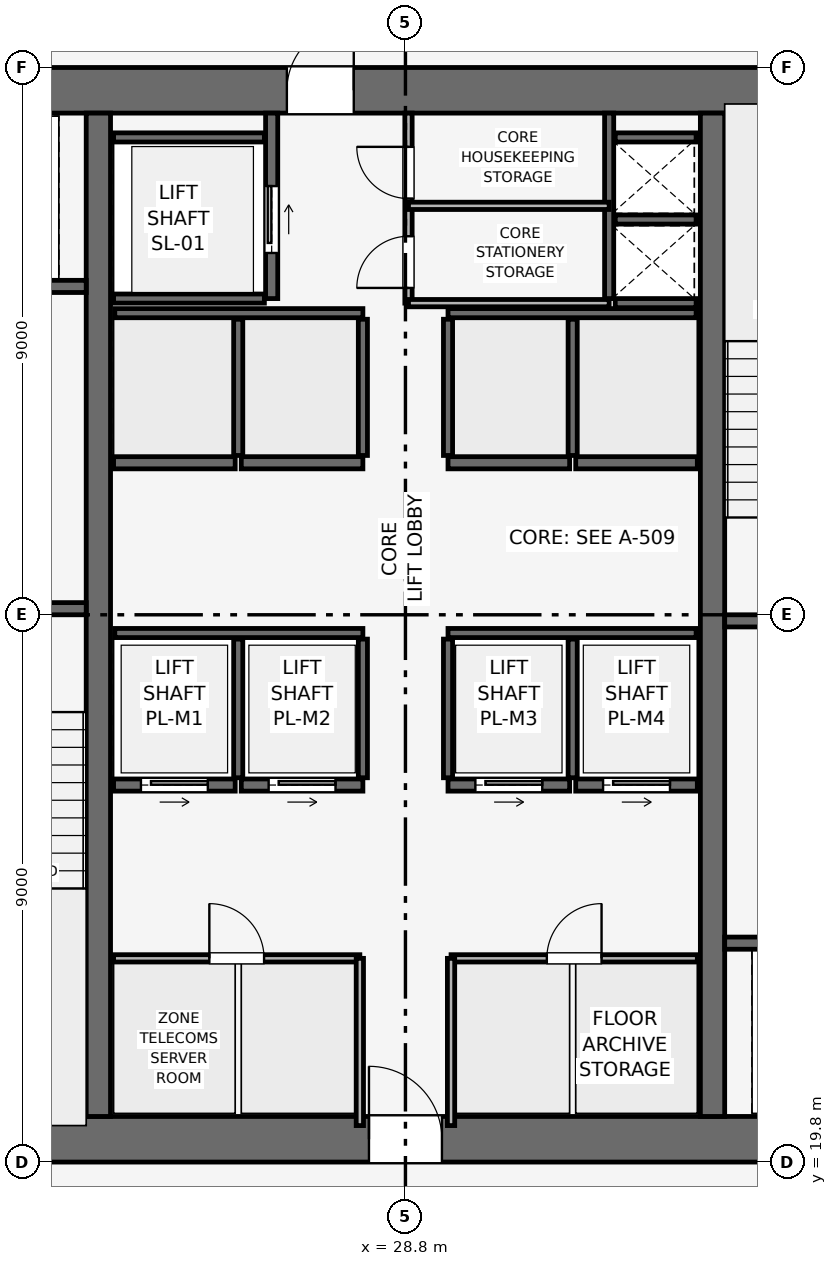
"""IFC4 building model, lengths in metres.
Left out: names, types, materials, properties, quantities, classifications, styles, units other than length and angle.
Written with IfcOpenShell. Run it as: python <this file> out.ifc"""

import sys

from ifc_helpers import new_model, si_unit, direction, frame, frame_2d, origin, place, context, subcontext, project, spatial, rectangle, extrude, element, fill, save


model = new_model("IFC4")
c1 = context("Model", 3, precision=1e-05, world=origin(), true_north=direction((0.0, 1.0)))
c2 = subcontext(c1, "Body", "Model", "MODEL_VIEW")
j1 = project(units=[si_unit("LENGTHUNIT", "METRE"), si_unit("PLANEANGLEUNIT", "RADIAN")], contexts=[c1])
p1 = place(None, origin())
s1 = spatial("IfcSite", under=j1, at=p1, CompositionType="ELEMENT")
p2 = place(p1, origin())
s2 = spatial("IfcBuilding", under=s1, at=p2, CompositionType="ELEMENT")
p3 = place(p2, frame((0.0, 0.0, 233.7)))
s3 = spatial("IfcBuildingStorey", under=s2, at=p3, CompositionType="ELEMENT", Elevation=233.7)
p4 = place(p3, frame((19.8, 20.175, 0.0), z_axis=(0.0, 0.0, 1.0), x_axis=(1.0, 0.0, 0.0)))
e1 = element("IfcWall", 1, at=p4, inside=s3, PredefinedType="SHEAR", context=c2, shape_type="SweptSolid", body=[
    extrude(rectangle(XDim=18.0, YDim=0.75, at=frame_2d((9.0, 0.0))), origin(), (0.0, 0.0, 1.0), 3.75),
])
p5 = place(p4, frame((8.4, 0.0, 0.0)))
e2 = element("IfcOpeningElement", 2, at=p5, cuts=e1, PredefinedType="OPENING", context=c2, shape_type="SweptSolid", body=[
    extrude(rectangle(XDim=1.2, YDim=2.2, at=frame_2d((0.6, 1.1))), frame((0.0, 0.385, 0.0), z_axis=(0.0, -1.0, 0.0), x_axis=(1.0, 0.0, 0.0)), (0.0, 0.0, 1.0), 0.77),
])
p6 = place(p3, frame((19.8, 37.425, 0.0), z_axis=(0.0, 0.0, 1.0), x_axis=(1.0, 0.0, 0.0)))
e3 = element("IfcWall", 3, at=p6, inside=s3, PredefinedType="SHEAR", context=c2, shape_type="SweptSolid", body=[
    extrude(rectangle(XDim=18.0, YDim=0.75, at=frame_2d((9.0, 0.0))), origin(), (0.0, 0.0, 1.0), 3.75),
])
p7 = place(p6, frame((7.05, 0.0, 0.0)))
e4 = element("IfcOpeningElement", 4, at=p7, cuts=e3, PredefinedType="OPENING", context=c2, shape_type="SweptSolid", body=[
    extrude(rectangle(XDim=1.1, YDim=2.15, at=frame_2d((0.55, 1.075))), frame((0.0, 0.385, 0.0), z_axis=(0.0, -1.0, 0.0), x_axis=(1.0, 0.0, 0.0)), (0.0, 0.0, 1.0), 0.77),
])
for number, where, z_axis, x_axis in (
    (5, (23.75, 20.55, 0.0), (0.0, 0.0, 1.0), (0.0, 1.0, 0.0)),
    (6, (33.85, 20.55, 0.0), (0.0, 0.0, 1.0), (0.0, 1.0, 0.0)),
):
    element("IfcWall", number, at=place(p3, frame(where, z_axis=z_axis, x_axis=x_axis)), inside=s3, PredefinedType="SHEAR", context=c2, shape_type="SweptSolid", body=[
        extrude(rectangle(XDim=16.5, YDim=0.4, at=frame_2d((8.25, 0.0))), origin(), (0.0, 0.0, 1.0), 3.75),
    ])
p8 = place(p3, frame((20.4, 28.9, 0.0), z_axis=(0.0, 0.0, 1.0), x_axis=(1.0, 0.0, 0.0)))
e7 = element("IfcWall", 7, at=p8, inside=s3, PredefinedType="SHEAR", context=c2, shape_type="SweptSolid", body=[
    extrude(rectangle(XDim=3.15, YDim=0.2, at=frame_2d((1.575, 0.0))), origin(), (0.0, 0.0, 1.0), 3.5),
])
p9 = place(p8, frame((0.8, 0.0, 0.0)))
e8 = element("IfcOpeningElement", 8, at=p9, cuts=e7, PredefinedType="OPENING", context=c2, shape_type="SweptSolid", body=[
    extrude(rectangle(XDim=1.0, YDim=2.1, at=frame_2d((0.5, 1.05))), frame((0.0, 0.11, 0.0), z_axis=(0.0, -1.0, 0.0), x_axis=(1.0, 0.0, 0.0)), (0.0, 0.0, 1.0), 0.22),
])
p10 = place(p3, frame((34.05, 28.7, 0.0), z_axis=(0.0, 0.0, 1.0), x_axis=(1.0, 0.0, 0.0)))
e9 = element("IfcWall", 9, at=p10, inside=s3, PredefinedType="SHEAR", context=c2, shape_type="SweptSolid", body=[
    extrude(rectangle(XDim=3.15, YDim=0.2, at=frame_2d((1.575, 0.0))), origin(), (0.0, 0.0, 1.0), 3.5),
])
p11 = place(p10, frame((0.8, 0.0, 0.0)))
e10 = element("IfcOpeningElement", 10, at=p11, cuts=e9, PredefinedType="OPENING", context=c2, shape_type="SweptSolid", body=[
    extrude(rectangle(XDim=1.0, YDim=2.1, at=frame_2d((0.5, 1.05))), frame((0.0, 0.11, 0.0), z_axis=(0.0, -1.0, 0.0), x_axis=(1.0, 0.0, 0.0)), (0.0, 0.0, 1.0), 0.22),
])
p12 = place(p3, frame((32.15, 34.0, 0.0), z_axis=(0.0, 0.0, 1.0), x_axis=(0.0, 1.0, 0.0)))
e11 = element("IfcWall", 11, at=p12, inside=s3, PredefinedType="SHEAR", context=c2, shape_type="SweptSolid", body=[
    extrude(rectangle(XDim=3.05, YDim=0.15, at=frame_2d((1.525, 0.0))), origin(), (0.0, 0.0, 1.0), 3.5),
])
for number, where, z_axis, x_axis in (
    (12, (32.25, 33.925, 0.0), (0.0, 0.0, 1.0), (1.0, 0.0, 0.0)),
    (13, (32.25, 35.3, 0.0), (0.0, 0.0, 1.0), (1.0, 0.0, 0.0)),
):
    element("IfcWall", number, at=place(p3, frame(where, z_axis=z_axis, x_axis=x_axis)), inside=s3, PredefinedType="SHEAR", context=c2, shape_type="SweptSolid", body=[
        extrude(rectangle(XDim=1.33, YDim=0.15, at=frame_2d((0.665, 0.0))), origin(), (0.0, 0.0, 1.0), 3.5),
    ])
p13 = place(p3, frame((20.5, 34.2, 0.0), z_axis=(0.0, 0.0, 1.0), x_axis=(1.0, 0.0, 0.0)))
e14 = element("IfcWall", 14, at=p13, inside=s3, PredefinedType="SHEAR", context=c2, shape_type="SweptSolid", body=[
    extrude(rectangle(XDim=3.05, YDim=0.2, at=frame_2d((1.525, 0.0))), origin(), (0.0, 0.0, 1.0), 3.5),
])
p14 = place(p13, frame((0.75, 0.0, 0.0)))
e15 = element("IfcOpeningElement", 15, at=p14, cuts=e14, PredefinedType="OPENING", context=c2, shape_type="SweptSolid", body=[
    extrude(rectangle(XDim=1.1, YDim=2.15, at=frame_2d((0.55, 1.075))), frame((0.0, 0.11, 0.0), z_axis=(0.0, -1.0, 0.0), x_axis=(1.0, 0.0, 0.0)), (0.0, 0.0, 1.0), 0.22),
])
p15 = place(p3, frame((34.05, 23.4, 0.0), z_axis=(0.0, 0.0, 1.0), x_axis=(1.0, 0.0, 0.0)))
e16 = element("IfcWall", 16, at=p15, inside=s3, PredefinedType="SHEAR", context=c2, shape_type="SweptSolid", body=[
    extrude(rectangle(XDim=3.05, YDim=0.2, at=frame_2d((1.525, 0.0))), origin(), (0.0, 0.0, 1.0), 3.5),
])
p16 = place(p15, frame((1.2, 0.0, 0.0)))
e17 = element("IfcOpeningElement", 17, at=p16, cuts=e16, PredefinedType="OPENING", context=c2, shape_type="SweptSolid", body=[
    extrude(rectangle(XDim=1.1, YDim=2.15, at=frame_2d((0.55, 1.075))), frame((0.0, 0.11, 0.0), z_axis=(0.0, -1.0, 0.0), x_axis=(1.0, 0.0, 0.0)), (0.0, 0.0, 1.0), 0.22),
])
p17 = place(p3, frame((26.6, 34.0, 0.0), z_axis=(0.0, 0.0, 1.0), x_axis=(0.0, 1.0, 0.0)))
e18 = element("IfcWall", 18, at=p17, inside=s3, PredefinedType="SHEAR", context=c2, shape_type="SweptSolid", body=[
    extrude(rectangle(XDim=3.05, YDim=0.2, at=frame_2d((1.525, 0.0))), origin(), (0.0, 0.0, 1.0), 3.5),
])
p18 = place(p17, frame((0.75, 0.0, 0.0)))
e19 = element("IfcOpeningElement", 19, at=p18, cuts=e18, PredefinedType="OPENING", context=c2, shape_type="SweptSolid", body=[
    extrude(rectangle(XDim=1.1, YDim=2.15, at=frame_2d((0.55, 1.075))), frame((0.0, 0.11, 0.0), z_axis=(0.0, -1.0, 0.0), x_axis=(1.0, 0.0, 0.0)), (0.0, 0.0, 1.0), 0.22),
])
for number, where, z_axis, x_axis in (
    (20, (24.0, 34.0, 0.0), (0.0, 0.0, 1.0), (1.0, 0.0, 0.0)),
    (21, (24.0, 36.65, 0.0), (0.0, 0.0, 1.0), (1.0, 0.0, 0.0)),
):
    element("IfcWall", number, at=place(p3, frame(where, z_axis=z_axis, x_axis=x_axis)), inside=s3, PredefinedType="SHEAR", context=c2, shape_type="SweptSolid", body=[
        extrude(rectangle(XDim=2.48, YDim=0.15, at=frame_2d((1.24, 0.0))), origin(), (0.0, 0.0, 1.0), 3.5),
    ])
p19 = place(p3, frame((24.0, 26.0, 0.0), z_axis=(0.0, 0.0, 1.0), x_axis=(1.0, 0.0, 0.0)))
e22 = element("IfcWall", 22, at=p19, inside=s3, PredefinedType="SHEAR", context=c2, shape_type="SweptSolid", body=[
    extrude(rectangle(XDim=2.0, YDim=0.2, at=frame_2d((1.0, 0.0))), origin(), (0.0, 0.0, 1.0), 3.5),
])
p20 = place(p19, frame((0.45, 0.0, 0.0)))
e23 = element("IfcOpeningElement", 23, at=p20, cuts=e22, PredefinedType="OPENING", context=c2, shape_type="SweptSolid", body=[
    extrude(rectangle(XDim=1.1, YDim=2.15, at=frame_2d((0.55, 1.075))), frame((0.0, 0.11, 0.0), z_axis=(0.0, -1.0, 0.0), x_axis=(1.0, 0.0, 0.0)), (0.0, 0.0, 1.0), 0.22),
])
p21 = place(p3, frame((26.1, 26.0, 0.0), z_axis=(0.0, 0.0, 1.0), x_axis=(1.0, 0.0, 0.0)))
e24 = element("IfcWall", 24, at=p21, inside=s3, PredefinedType="SHEAR", context=c2, shape_type="SweptSolid", body=[
    extrude(rectangle(XDim=2.0, YDim=0.2, at=frame_2d((1.0, 0.0))), origin(), (0.0, 0.0, 1.0), 3.5),
])
p22 = place(p21, frame((0.45, 0.0, 0.0)))
e25 = element("IfcOpeningElement", 25, at=p22, cuts=e24, PredefinedType="OPENING", context=c2, shape_type="SweptSolid", body=[
    extrude(rectangle(XDim=1.1, YDim=2.15, at=frame_2d((0.55, 1.075))), frame((0.0, 0.11, 0.0), z_axis=(0.0, -1.0, 0.0), x_axis=(1.0, 0.0, 0.0)), (0.0, 0.0, 1.0), 0.22),
])
p23 = place(p3, frame((29.5, 26.0, 0.0), z_axis=(0.0, 0.0, 1.0), x_axis=(1.0, 0.0, 0.0)))
e26 = element("IfcWall", 26, at=p23, inside=s3, PredefinedType="SHEAR", context=c2, shape_type="SweptSolid", body=[
    extrude(rectangle(XDim=2.0, YDim=0.2, at=frame_2d((1.0, 0.0))), origin(), (0.0, 0.0, 1.0), 3.5),
])
p24 = place(p23, frame((0.45, 0.0, 0.0)))
e27 = element("IfcOpeningElement", 27, at=p24, cuts=e26, PredefinedType="OPENING", context=c2, shape_type="SweptSolid", body=[
    extrude(rectangle(XDim=1.1, YDim=2.15, at=frame_2d((0.55, 1.075))), frame((0.0, 0.11, 0.0), z_axis=(0.0, -1.0, 0.0), x_axis=(1.0, 0.0, 0.0)), (0.0, 0.0, 1.0), 0.22),
])
p25 = place(p3, frame((31.6, 26.0, 0.0), z_axis=(0.0, 0.0, 1.0), x_axis=(1.0, 0.0, 0.0)))
e28 = element("IfcWall", 28, at=p25, inside=s3, PredefinedType="SHEAR", context=c2, shape_type="SweptSolid", body=[
    extrude(rectangle(XDim=2.0, YDim=0.2, at=frame_2d((1.0, 0.0))), origin(), (0.0, 0.0, 1.0), 3.5),
])
p26 = place(p25, frame((0.45, 0.0, 0.0)))
e29 = element("IfcOpeningElement", 29, at=p26, cuts=e28, PredefinedType="OPENING", context=c2, shape_type="SweptSolid", body=[
    extrude(rectangle(XDim=1.1, YDim=2.15, at=frame_2d((0.55, 1.075))), frame((0.0, 0.11, 0.0), z_axis=(0.0, -1.0, 0.0), x_axis=(1.0, 0.0, 0.0)), (0.0, 0.0, 1.0), 0.22),
])
for number, where, z_axis, x_axis in (
    (30, (24.0, 31.3, 0.0), (0.0, 0.0, 1.0), (1.0, 0.0, 0.0)),
    (31, (26.1, 31.3, 0.0), (0.0, 0.0, 1.0), (1.0, 0.0, 0.0)),
    (32, (29.5, 31.3, 0.0), (0.0, 0.0, 1.0), (1.0, 0.0, 0.0)),
    (33, (31.6, 31.3, 0.0), (0.0, 0.0, 1.0), (1.0, 0.0, 0.0)),
):
    element("IfcWall", number, at=place(p3, frame(where, z_axis=z_axis, x_axis=x_axis)), inside=s3, PredefinedType="SHEAR", context=c2, shape_type="SweptSolid", body=[
        extrude(rectangle(XDim=2.0, YDim=0.2, at=frame_2d((1.0, 0.0))), origin(), (0.0, 0.0, 1.0), 3.5),
    ])
p27 = place(p3, frame((32.25, 36.65, 0.0), z_axis=(0.0, 0.0, 1.0), x_axis=(1.0, 0.0, 0.0)))
e34 = element("IfcWall", 34, at=p27, inside=s3, PredefinedType="SHEAR", context=c2, shape_type="SweptSolid", body=[
    extrude(rectangle(XDim=1.33, YDim=0.15, at=frame_2d((0.665, 0.0))), origin(), (0.0, 0.0, 1.0), 3.5),
])
for number, where, z_axis, x_axis in (
    (35, (24.02, 28.5, 0.0), (0.0, 0.0, 1.0), (1.0, 0.0, 0.0)),
    (36, (29.5, 28.5, 0.0), (0.0, 0.0, 1.0), (1.0, 0.0, 0.0)),
):
    element("IfcWall", number, at=place(p3, frame(where, z_axis=z_axis, x_axis=x_axis)), inside=s3, PredefinedType="SHEAR", context=c2, shape_type="SweptSolid", body=[
        extrude(rectangle(XDim=4.08, YDim=0.15, at=frame_2d((2.04, 0.0))), origin(), (0.0, 0.0, 1.0), 3.5),
    ])
for number, where, z_axis, x_axis in (
    (37, (26.05, 26.12, 0.0), (0.0, 0.0, 1.0), (0.0, 1.0, 0.0)),
    (38, (28.1, 26.12, 0.0), (0.0, 0.0, 1.0), (0.0, 1.0, 0.0)),
    (39, (29.5, 26.12, 0.0), (0.0, 0.0, 1.0), (0.0, 1.0, 0.0)),
    (40, (31.55, 26.12, 0.0), (0.0, 0.0, 1.0), (0.0, 1.0, 0.0)),
):
    element("IfcWall", number, at=place(p3, frame(where, z_axis=z_axis, x_axis=x_axis)), inside=s3, PredefinedType="SHEAR", context=c2, shape_type="SweptSolid", body=[
        extrude(rectangle(XDim=2.28, YDim=0.15, at=frame_2d((1.14, 0.0))), origin(), (0.0, 0.0, 1.0), 3.5),
    ])
for number, where, z_axis, x_axis in (
    (41, (24.02, 33.76, 0.0), (0.0, 0.0, 1.0), (1.0, 0.0, 0.0)),
    (42, (29.5, 33.76, 0.0), (0.0, 0.0, 1.0), (1.0, 0.0, 0.0)),
):
    element("IfcWall", number, at=place(p3, frame(where, z_axis=z_axis, x_axis=x_axis)), inside=s3, PredefinedType="SHEAR", context=c2, shape_type="SweptSolid", body=[
        extrude(rectangle(XDim=4.08, YDim=0.15, at=frame_2d((2.04, 0.0))), origin(), (0.0, 0.0, 1.0), 3.5),
    ])
for number, where, z_axis, x_axis in (
    (43, (26.05, 31.42, 0.0), (0.0, 0.0, 1.0), (0.0, 1.0, 0.0)),
    (44, (28.1, 31.42, 0.0), (0.0, 0.0, 1.0), (0.0, 1.0, 0.0)),
    (45, (29.5, 31.42, 0.0), (0.0, 0.0, 1.0), (0.0, 1.0, 0.0)),
    (46, (31.55, 31.42, 0.0), (0.0, 0.0, 1.0), (0.0, 1.0, 0.0)),
):
    element("IfcWall", number, at=place(p3, frame(where, z_axis=z_axis, x_axis=x_axis)), inside=s3, PredefinedType="SHEAR", context=c2, shape_type="SweptSolid", body=[
        extrude(rectangle(XDim=2.24, YDim=0.15, at=frame_2d((1.12, 0.0))), origin(), (0.0, 0.0, 1.0), 3.5),
    ])
p28 = place(p3, frame((28.85, 33.925, 0.0), z_axis=(0.0, 0.0, 1.0), x_axis=(0.0, 1.0, 0.0)))
e47 = element("IfcWall", 47, at=p28, inside=s3, PredefinedType="PARTITIONING", context=c2, shape_type="SweptSolid", body=[
    extrude(rectangle(XDim=3.125, YDim=0.12, at=frame_2d((1.562, 0.0))), origin(), (0.0, 0.0, 1.0), 3.5),
])
p29 = place(p28, frame((0.25, 0.0, 0.0)))
e48 = element("IfcOpeningElement", 48, at=p29, cuts=e47, PredefinedType="OPENING", context=c2, shape_type="SweptSolid", body=[
    extrude(rectangle(XDim=0.85, YDim=2.1, at=frame_2d((0.425, 1.05))), frame((0.0, 0.07, 0.0), z_axis=(0.0, -1.0, 0.0), x_axis=(1.0, 0.0, 0.0)), (0.0, 0.0, 1.0), 0.14),
])
p30 = place(p28, frame((1.72, 0.0, 0.0)))
e49 = element("IfcOpeningElement", 49, at=p30, cuts=e47, PredefinedType="OPENING", context=c2, shape_type="SweptSolid", body=[
    extrude(rectangle(XDim=0.85, YDim=2.1, at=frame_2d((0.425, 1.05))), frame((0.0, 0.07, 0.0), z_axis=(0.0, -1.0, 0.0), x_axis=(1.0, 0.0, 0.0)), (0.0, 0.0, 1.0), 0.14),
])
for number, where, z_axis, x_axis in (
    (50, (28.85, 35.525, 0.0), (0.0, 0.0, 1.0), (1.0, 0.0, 0.0)),
    (51, (28.85, 33.925, 0.0), (0.0, 0.0, 1.0), (1.0, 0.0, 0.0)),
):
    element("IfcWall", number, at=place(p3, frame(where, z_axis=z_axis, x_axis=x_axis)), inside=s3, PredefinedType="PARTITIONING", context=c2, shape_type="SweptSolid", body=[
        extrude(rectangle(XDim=3.3, YDim=0.12, at=frame_2d((1.65, 0.0))), origin(), (0.0, 0.0, 1.0), 3.5),
    ])
p31 = place(p3, frame((24.0, 23.15, 0.0), z_axis=(0.0, 0.0, 1.0), x_axis=(1.0, 0.0, 0.0)))
e52 = element("IfcWall", 52, at=p31, inside=s3, PredefinedType="PARTITIONING", context=c2, shape_type="SweptSolid", body=[
    extrude(rectangle(XDim=4.05, YDim=0.12, at=frame_2d((2.025, 0.0))), origin(), (0.0, 0.0, 1.0), 3.5),
])
p32 = place(p31, frame((1.575, 0.0, 0.0)))
e53 = element("IfcOpeningElement", 53, at=p32, cuts=e52, PredefinedType="OPENING", context=c2, shape_type="SweptSolid", body=[
    extrude(rectangle(XDim=0.9, YDim=2.1, at=frame_2d((0.45, 1.05))), frame((0.0, 0.07, 0.0), z_axis=(0.0, -1.0, 0.0), x_axis=(1.0, 0.0, 0.0)), (0.0, 0.0, 1.0), 0.14),
])
p33 = place(p3, frame((28.05, 20.4, 0.0), z_axis=(0.0, 0.0, 1.0), x_axis=(0.0, 1.0, 0.0)))
e54 = element("IfcWall", 54, at=p33, inside=s3, PredefinedType="PARTITIONING", context=c2, shape_type="SweptSolid", body=[
    extrude(rectangle(XDim=2.75, YDim=0.12, at=frame_2d((1.375, 0.0))), origin(), (0.0, 0.0, 1.0), 3.5),
])
p34 = place(p3, frame((29.55, 23.15, 0.0), z_axis=(0.0, 0.0, 1.0), x_axis=(1.0, 0.0, 0.0)))
e55 = element("IfcWall", 55, at=p34, inside=s3, PredefinedType="PARTITIONING", context=c2, shape_type="SweptSolid", body=[
    extrude(rectangle(XDim=4.05, YDim=0.12, at=frame_2d((2.025, 0.0))), origin(), (0.0, 0.0, 1.0), 3.5),
])
p35 = place(p34, frame((1.575, 0.0, 0.0)))
e56 = element("IfcOpeningElement", 56, at=p35, cuts=e55, PredefinedType="OPENING", context=c2, shape_type="SweptSolid", body=[
    extrude(rectangle(XDim=0.9, YDim=2.1, at=frame_2d((0.45, 1.05))), frame((0.0, 0.07, 0.0), z_axis=(0.0, -1.0, 0.0), x_axis=(1.0, 0.0, 0.0)), (0.0, 0.0, 1.0), 0.14),
])
p36 = place(p3, frame((29.55, 20.4, 0.0), z_axis=(0.0, 0.0, 1.0), x_axis=(0.0, 1.0, 0.0)))
e57 = element("IfcWall", 57, at=p36, inside=s3, PredefinedType="PARTITIONING", context=c2, shape_type="SweptSolid", body=[
    extrude(rectangle(XDim=2.75, YDim=0.12, at=frame_2d((1.375, 0.0))), origin(), (0.0, 0.0, 1.0), 3.5),
])
p37 = place(p18, origin())
e58 = element("IfcDoor", 58, at=p37, inside=s3, OperationType="SLIDING_TO_RIGHT", PredefinedType="DOOR", context=c2, shape_type="SweptSolid", body=[
    extrude(rectangle(XDim=1.1, YDim=2.15, at=frame_2d((0.55, 1.075))), frame((0.0, 0.025, 0.0), z_axis=(0.0, -1.0, 0.0), x_axis=(1.0, 0.0, 0.0)), (0.0, 0.0, 1.0), 0.05),
])
fill(e19, e58)
p38 = place(p20, origin())
e59 = element("IfcDoor", 59, at=p38, inside=s3, OperationType="SLIDING_TO_RIGHT", PredefinedType="DOOR", context=c2, shape_type="SweptSolid", body=[
    extrude(rectangle(XDim=1.1, YDim=2.15, at=frame_2d((0.55, 1.075))), frame((0.0, 0.025, 0.0), z_axis=(0.0, -1.0, 0.0), x_axis=(1.0, 0.0, 0.0)), (0.0, 0.0, 1.0), 0.05),
])
fill(e23, e59)
p39 = place(p22, origin())
e60 = element("IfcDoor", 60, at=p39, inside=s3, OperationType="SLIDING_TO_RIGHT", PredefinedType="DOOR", context=c2, shape_type="SweptSolid", body=[
    extrude(rectangle(XDim=1.1, YDim=2.15, at=frame_2d((0.55, 1.075))), frame((0.0, 0.025, 0.0), z_axis=(0.0, -1.0, 0.0), x_axis=(1.0, 0.0, 0.0)), (0.0, 0.0, 1.0), 0.05),
])
fill(e25, e60)
p40 = place(p24, origin())
e61 = element("IfcDoor", 61, at=p40, inside=s3, OperationType="SLIDING_TO_RIGHT", PredefinedType="DOOR", context=c2, shape_type="SweptSolid", body=[
    extrude(rectangle(XDim=1.1, YDim=2.15, at=frame_2d((0.55, 1.075))), frame((0.0, 0.025, 0.0), z_axis=(0.0, -1.0, 0.0), x_axis=(1.0, 0.0, 0.0)), (0.0, 0.0, 1.0), 0.05),
])
fill(e27, e61)
p41 = place(p26, origin())
e62 = element("IfcDoor", 62, at=p41, inside=s3, OperationType="SLIDING_TO_RIGHT", PredefinedType="DOOR", context=c2, shape_type="SweptSolid", body=[
    extrude(rectangle(XDim=1.1, YDim=2.15, at=frame_2d((0.55, 1.075))), frame((0.0, 0.025, 0.0), z_axis=(0.0, -1.0, 0.0), x_axis=(1.0, 0.0, 0.0)), (0.0, 0.0, 1.0), 0.05),
])
fill(e29, e62)
p42 = place(p29, origin())
e63 = element("IfcDoor", 63, at=p42, inside=s3, OperationType="SINGLE_SWING_LEFT", PredefinedType="DOOR", context=c2, shape_type="SweptSolid", body=[
    extrude(rectangle(XDim=0.85, YDim=2.1, at=frame_2d((0.425, 1.05))), frame((0.0, 0.025, 0.0), z_axis=(0.0, -1.0, 0.0), x_axis=(1.0, 0.0, 0.0)), (0.0, 0.0, 1.0), 0.05),
])
fill(e48, e63)
p43 = place(p30, origin())
e64 = element("IfcDoor", 64, at=p43, inside=s3, OperationType="SINGLE_SWING_RIGHT", PredefinedType="DOOR", context=c2, shape_type="SweptSolid", body=[
    extrude(rectangle(XDim=0.85, YDim=2.1, at=frame_2d((0.425, 1.05))), frame((0.0, 0.025, 0.0), z_axis=(0.0, -1.0, 0.0), x_axis=(1.0, 0.0, 0.0)), (0.0, 0.0, 1.0), 0.05),
])
fill(e49, e64)
p44 = place(p32, origin())
e65 = element("IfcDoor", 65, at=p44, inside=s3, OperationType="SINGLE_SWING_LEFT", PredefinedType="DOOR", context=c2, shape_type="SweptSolid", body=[
    extrude(rectangle(XDim=0.9, YDim=2.1, at=frame_2d((0.45, 1.05))), frame((0.0, 0.025, 0.0), z_axis=(0.0, -1.0, 0.0), x_axis=(1.0, 0.0, 0.0)), (0.0, 0.0, 1.0), 0.05),
])
fill(e53, e65)
p45 = place(p35, origin())
e66 = element("IfcDoor", 66, at=p45, inside=s3, OperationType="SINGLE_SWING_RIGHT", PredefinedType="DOOR", context=c2, shape_type="SweptSolid", body=[
    extrude(rectangle(XDim=0.9, YDim=2.1, at=frame_2d((0.45, 1.05))), frame((0.0, 0.025, 0.0), z_axis=(0.0, -1.0, 0.0), x_axis=(1.0, 0.0, 0.0)), (0.0, 0.0, 1.0), 0.05),
])
fill(e56, e66)
p46 = place(p5, origin())
e67 = element("IfcDoor", 67, at=p46, inside=s3, OperationType="SINGLE_SWING_LEFT", PredefinedType="DOOR", context=c2, shape_type="SweptSolid", body=[
    extrude(rectangle(XDim=1.2, YDim=2.2, at=frame_2d((0.6, 1.1))), frame((0.0, 0.025, 0.0), z_axis=(0.0, -1.0, 0.0), x_axis=(1.0, 0.0, 0.0)), (0.0, 0.0, 1.0), 0.05),
])
fill(e2, e67)
p47 = place(p7, origin())
e68 = element("IfcDoor", 68, at=p47, inside=s3, OperationType="SINGLE_SWING_RIGHT", PredefinedType="DOOR", context=c2, shape_type="SweptSolid", body=[
    extrude(rectangle(XDim=1.1, YDim=2.15, at=frame_2d((0.55, 1.075))), frame((0.0, 0.025, 0.0), z_axis=(0.0, -1.0, 0.0), x_axis=(1.0, 0.0, 0.0)), (0.0, 0.0, 1.0), 0.05),
])
fill(e4, e68)
save(model, sys.argv[1])
